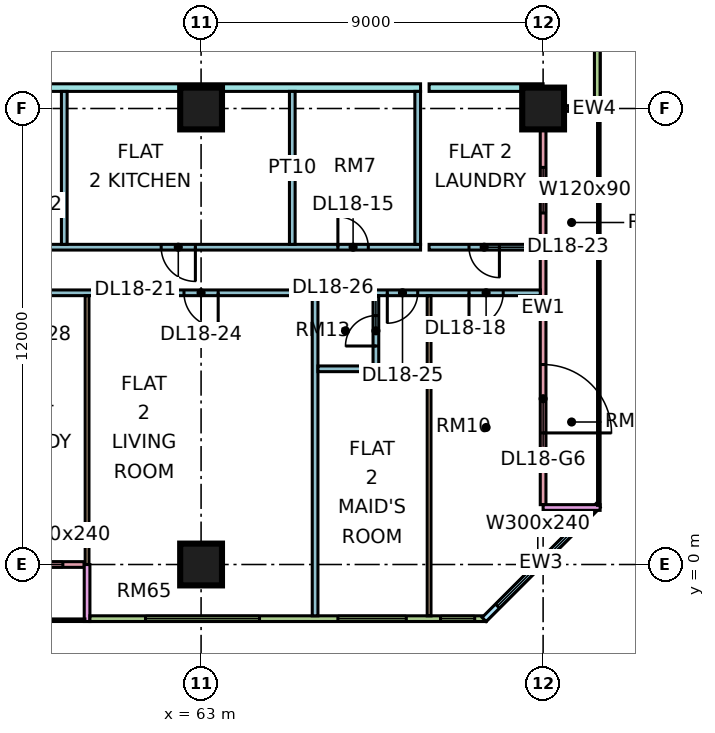
"""IFC4 building model, lengths in metres.
Left out: names, types, materials, properties, quantities, classifications, styles, units other than length and angle.
Written with IfcOpenShell. Run it as: python <this file> out.ifc"""

import sys

from ifc_helpers import new_model, si_unit, direction, frame, frame_2d, origin, origin_2d, place, context, subcontext, project, spatial, rectangle, extrude, element, fill, save


model = new_model("IFC4")
c1 = context("Model", 3, precision=1e-05, world=origin(), true_north=direction((0.0, 1.0)))
c2 = subcontext(c1, "Body", "Model", "MODEL_VIEW")
j1 = project(units=[si_unit("LENGTHUNIT", "METRE"), si_unit("PLANEANGLEUNIT", "RADIAN")], contexts=[c1])
p1 = place(None, origin())
s1 = spatial("IfcSite", under=j1, at=p1, CompositionType="ELEMENT")
p2 = place(p1, origin())
s2 = spatial("IfcBuilding", under=s1, at=p2, CompositionType="ELEMENT")
p3 = place(p2, frame((0.0, 0.0, 82.65)))
s3 = spatial("IfcBuildingStorey", under=s2, at=p3, CompositionType="ELEMENT", Elevation=82.65)
for number, where, z_axis, x_axis in (
    (1, (63.0, 0.0, 0.0), (0.0, 0.0, 1.0), (1.0, 0.0, 0.0)),
    (2, (63.0, 12.0, 0.0), (0.0, 0.0, 1.0), (1.0, 0.0, 0.0)),
    (3, (72.0, 12.0, 0.0), (0.0, 0.0, 1.0), (1.0, 0.0, 0.0)),
):
    element("IfcColumn", number, at=place(p3, frame(where, z_axis=z_axis, x_axis=x_axis)), inside=s3, PredefinedType="COLUMN", context=c2, shape_type="SweptSolid", body=[
        extrude(rectangle(XDim=1.1, YDim=1.1, at=origin_2d()), origin(), (0.0, 0.0, 1.0), 3.75),
    ])
p4 = place(p3, frame((48.075, 0.0, 0.0), z_axis=(0.0, 0.0, 1.0), x_axis=(1.0, 0.0, 0.0)))
e4 = element("IfcWall", 4, at=p4, inside=s3, PredefinedType="SOLIDWALL", context=c2, shape_type="SweptSolid", body=[
    extrude(rectangle(XDim=11.85, YDim=0.15, at=frame_2d((5.925, 0.0))), origin(), (0.0, 0.0, 1.0), 3.3),
])
p5 = place(p4, frame((0.562, 0.0, 0.45)))
e5 = element("IfcOpeningElement", 5, at=p5, cuts=e4, PredefinedType="OPENING", context=c2, shape_type="SweptSolid", body=[
    extrude(rectangle(XDim=1.8, YDim=2.4, at=frame_2d((0.9, 1.2))), frame((0.0, 0.085, 0.0), z_axis=(0.0, -1.0, 0.0), x_axis=(1.0, 0.0, 0.0)), (0.0, 0.0, 1.0), 0.17),
])
p6 = place(p4, frame((3.5, 0.0, 0.45)))
e6 = element("IfcOpeningElement", 6, at=p6, cuts=e4, PredefinedType="OPENING", context=c2, shape_type="SweptSolid", body=[
    extrude(rectangle(XDim=1.2, YDim=2.4, at=frame_2d((0.6, 1.2))), frame((0.0, 0.085, 0.0), z_axis=(0.0, -1.0, 0.0), x_axis=(1.0, 0.0, 0.0)), (0.0, 0.0, 1.0), 0.17),
])
p7 = place(p4, frame((7.15, 0.0, 0.45)))
e7 = element("IfcOpeningElement", 7, at=p7, cuts=e4, PredefinedType="OPENING", context=c2, shape_type="SweptSolid", body=[
    extrude(rectangle(XDim=1.2, YDim=2.4, at=frame_2d((0.6, 1.2))), frame((0.0, 0.085, 0.0), z_axis=(0.0, -1.0, 0.0), x_axis=(1.0, 0.0, 0.0)), (0.0, 0.0, 1.0), 0.17),
])
p8 = place(p4, frame((9.488, 0.0, 0.45)))
e8 = element("IfcOpeningElement", 8, at=p8, cuts=e4, PredefinedType="OPENING", context=c2, shape_type="SweptSolid", body=[
    extrude(rectangle(XDim=1.8, YDim=2.4, at=frame_2d((0.9, 1.2))), frame((0.0, 0.085, 0.0), z_axis=(0.0, -1.0, 0.0), x_axis=(1.0, 0.0, 0.0)), (0.0, 0.0, 1.0), 0.17),
])
p9 = place(p3, frame((60.0, -1.5, 0.0), z_axis=(0.0, 0.0, 1.0), x_axis=(0.0, 1.0, 0.0)))
e9 = element("IfcWall", 9, at=p9, inside=s3, PredefinedType="SOLIDWALL", context=c2, shape_type="SweptSolid", body=[
    extrude(rectangle(XDim=1.5, YDim=0.15, at=frame_2d((0.75, 0.0))), origin(), (0.0, 0.0, 1.0), 3.3),
])
p10 = place(p3, frame((60.075, -1.425, 0.0), z_axis=(0.0, 0.0, 1.0), x_axis=(1.0, 0.0, 0.0)))
e10 = element("IfcWall", 10, at=p10, inside=s3, PredefinedType="SOLIDWALL", context=c2, shape_type="SweptSolid", body=[
    extrude(rectangle(XDim=10.425, YDim=0.15, at=frame_2d((5.212, 0.0))), origin(), (0.0, 0.0, 1.0), 3.3),
])
p11 = place(p10, frame((1.462, 0.0, 0.45)))
e11 = element("IfcOpeningElement", 11, at=p11, cuts=e10, PredefinedType="OPENING", context=c2, shape_type="SweptSolid", body=[
    extrude(rectangle(XDim=3.0, YDim=2.4, at=frame_2d((1.5, 1.2))), frame((0.0, 0.085, 0.0), z_axis=(0.0, -1.0, 0.0), x_axis=(1.0, 0.0, 0.0)), (0.0, 0.0, 1.0), 0.17),
])
p12 = place(p10, frame((6.525, 0.0, 0.45)))
e12 = element("IfcOpeningElement", 12, at=p12, cuts=e10, PredefinedType="OPENING", context=c2, shape_type="SweptSolid", body=[
    extrude(rectangle(XDim=1.8, YDim=2.4, at=frame_2d((0.9, 1.2))), frame((0.0, 0.085, 0.0), z_axis=(0.0, -1.0, 0.0), x_axis=(1.0, 0.0, 0.0)), (0.0, 0.0, 1.0), 0.17),
])
p13 = place(p10, frame((9.225, 0.0, 0.45)))
e13 = element("IfcOpeningElement", 13, at=p13, cuts=e10, PredefinedType="OPENING", context=c2, shape_type="SweptSolid", body=[
    extrude(rectangle(XDim=0.9, YDim=2.4, at=frame_2d((0.45, 1.2))), frame((0.0, 0.085, 0.0), z_axis=(0.0, -1.0, 0.0), x_axis=(1.0, 0.0, 0.0)), (0.0, 0.0, 1.0), 0.17),
])
p14 = place(p3, frame((70.447, -1.447, 0.0), z_axis=(0.0, 0.0, 1.0), x_axis=(0.707106781187, 0.707106781187, 0.0)))
e14 = element("IfcWall", 14, at=p14, inside=s3, PredefinedType="SOLIDWALL", context=c2, shape_type="SweptSolid", body=[
    extrude(rectangle(XDim=4.243, YDim=0.15, at=frame_2d((2.121, 0.0))), origin(), (0.0, 0.0, 1.0), 3.3),
])
p15 = place(p14, frame((0.498, 0.0, 0.45)))
e15 = element("IfcOpeningElement", 15, at=p15, cuts=e14, PredefinedType="OPENING", context=c2, shape_type="SweptSolid", body=[
    extrude(rectangle(XDim=3.0, YDim=2.4, at=frame_2d((1.5, 1.2))), frame((0.0, 0.085, 0.0), z_axis=(0.0, -1.0, 0.0), x_axis=(1.0, 0.0, 0.0)), (0.0, 0.0, 1.0), 0.17),
])
p16 = place(p3, frame((72.0, 1.575, 0.0), z_axis=(0.0, 0.0, 1.0), x_axis=(0.0, 1.0, 0.0)))
e16 = element("IfcWall", 16, at=p16, inside=s3, PredefinedType="SOLIDWALL", context=c2, shape_type="SweptSolid", body=[
    extrude(rectangle(XDim=10.35, YDim=0.15, at=frame_2d((5.175, 0.0))), origin(), (0.0, 0.0, 1.0), 3.3),
])
p17 = place(p16, frame((1.887, 0.0, 0.0)))
e17 = element("IfcOpeningElement", 17, at=p17, cuts=e16, PredefinedType="OPENING", context=c2, shape_type="SweptSolid", body=[
    extrude(rectangle(XDim=1.8, YDim=2.4, at=frame_2d((0.9, 1.2))), frame((0.0, 0.085, 0.0), z_axis=(0.0, -1.0, 0.0), x_axis=(1.0, 0.0, 0.0)), (0.0, 0.0, 1.0), 0.17),
])
p18 = place(p16, frame((7.675, 0.0, 1.7)))
e18 = element("IfcOpeningElement", 18, at=p18, cuts=e16, PredefinedType="OPENING", context=c2, shape_type="SweptSolid", body=[
    extrude(rectangle(XDim=1.2, YDim=0.9, at=frame_2d((0.6, 0.45))), frame((0.0, 0.085, 0.0), z_axis=(0.0, -1.0, 0.0), x_axis=(1.0, 0.0, 0.0)), (0.0, 0.0, 1.0), 0.17),
])
for number, where, z_axis, x_axis in (
    (19, (73.5, 1.5, 0.0), (0.0, 0.0, 1.0), (-1.0, 0.0, 0.0)),
    (20, (73.5, 12.0, 0.0), (0.0, 0.0, 1.0), (-1.0, 0.0, 0.0)),
):
    element("IfcWall", number, at=place(p3, frame(where, z_axis=z_axis, x_axis=x_axis)), inside=s3, PredefinedType="SOLIDWALL", context=c2, shape_type="SweptSolid", body=[
        extrude(rectangle(XDim=1.5, YDim=0.15, at=frame_2d((0.75, 0.0))), origin(), (0.0, 0.0, 1.0), 3.3),
    ])
p19 = place(p3, frame((73.425, 12.075, 0.0), z_axis=(0.0, 0.0, 1.0), x_axis=(0.0, 1.0, 0.0)))
e21 = element("IfcWall", 21, at=p19, inside=s3, PredefinedType="SOLIDWALL", context=c2, shape_type="SweptSolid", body=[
    extrude(rectangle(XDim=10.425, YDim=0.15, at=frame_2d((5.212, 0.0))), origin(), (0.0, 0.0, 1.0), 3.3),
])
p20 = place(p19, frame((6.375, 0.0, 0.45)))
e22 = element("IfcOpeningElement", 22, at=p20, cuts=e21, PredefinedType="OPENING", context=c2, shape_type="SweptSolid", body=[
    extrude(rectangle(XDim=0.9, YDim=2.4, at=frame_2d((0.45, 1.2))), frame((0.0, 0.085, 0.0), z_axis=(0.0, -1.0, 0.0), x_axis=(1.0, 0.0, 0.0)), (0.0, 0.0, 1.0), 0.17),
])
p21 = place(p19, frame((8.175, 0.0, 0.45)))
e23 = element("IfcOpeningElement", 23, at=p21, cuts=e21, PredefinedType="OPENING", context=c2, shape_type="SweptSolid", body=[
    extrude(rectangle(XDim=1.8, YDim=2.4, at=frame_2d((0.9, 1.2))), frame((0.0, 0.085, 0.0), z_axis=(0.0, -1.0, 0.0), x_axis=(1.0, 0.0, 0.0)), (0.0, 0.0, 1.0), 0.17),
])
p22 = place(p3, frame((40.65, 12.55, 0.0), z_axis=(0.0, 0.0, 1.0), x_axis=(1.0, 0.0, 0.0)))
e24 = element("IfcWall", 24, at=p22, inside=s3, PredefinedType="PARTITIONING", context=c2, shape_type="SweptSolid", body=[
    extrude(rectangle(XDim=28.125, YDim=0.2, at=frame_2d((14.062, 0.0))), origin(), (0.0, 0.0, 1.0), 3.3),
])
p23 = place(p22, frame((11.4, 0.0, 0.0)))
e25 = element("IfcOpeningElement", 25, at=p23, cuts=e24, PredefinedType="OPENING", context=c2, shape_type="SweptSolid", body=[
    extrude(rectangle(XDim=1.0, YDim=2.1, at=frame_2d((0.5, 1.05))), frame((0.0, 0.11, 0.0), z_axis=(0.0, -1.0, 0.0), x_axis=(1.0, 0.0, 0.0)), (0.0, 0.0, 1.0), 0.22),
])
p24 = place(p22, frame((1.05, 0.0, 0.0)))
e26 = element("IfcOpeningElement", 26, at=p24, cuts=e24, PredefinedType="OPENING", context=c2, shape_type="SweptSolid", body=[
    extrude(rectangle(XDim=1.0, YDim=2.1, at=frame_2d((0.5, 1.05))), frame((0.0, 0.11, 0.0), z_axis=(0.0, -1.0, 0.0), x_axis=(1.0, 0.0, 0.0)), (0.0, 0.0, 1.0), 0.22),
])
p25 = place(p3, frame((48.1, 7.15, 0.0), z_axis=(0.0, 0.0, 1.0), x_axis=(1.0, 0.0, 0.0)))
e27 = element("IfcWall", 27, at=p25, inside=s3, PredefinedType="PARTITIONING", context=c2, shape_type="SweptSolid", body=[
    extrude(rectangle(XDim=23.826, YDim=0.15, at=frame_2d((11.913, 0.0))), origin(), (0.0, 0.0, 1.0), 3.3),
])
p26 = place(p25, frame((0.95, 0.0, 0.0)))
e28 = element("IfcOpeningElement", 28, at=p26, cuts=e27, PredefinedType="OPENING", context=c2, shape_type="SweptSolid", body=[
    extrude(rectangle(XDim=0.9, YDim=2.1, at=frame_2d((0.45, 1.05))), frame((0.0, 0.085, 0.0), z_axis=(0.0, -1.0, 0.0), x_axis=(1.0, 0.0, 0.0)), (0.0, 0.0, 1.0), 0.17),
])
p27 = place(p25, frame((6.95, 0.0, 0.0)))
e29 = element("IfcOpeningElement", 29, at=p27, cuts=e27, PredefinedType="OPENING", context=c2, shape_type="SweptSolid", body=[
    extrude(rectangle(XDim=0.9, YDim=2.1, at=frame_2d((0.45, 1.05))), frame((0.0, 0.085, 0.0), z_axis=(0.0, -1.0, 0.0), x_axis=(1.0, 0.0, 0.0)), (0.0, 0.0, 1.0), 0.17),
])
p28 = place(p25, frame((21.95, 0.0, 0.0)))
e30 = element("IfcOpeningElement", 30, at=p28, cuts=e27, PredefinedType="OPENING", context=c2, shape_type="SweptSolid", body=[
    extrude(rectangle(XDim=0.9, YDim=2.1, at=frame_2d((0.45, 1.05))), frame((0.0, 0.085, 0.0), z_axis=(0.0, -1.0, 0.0), x_axis=(1.0, 0.0, 0.0)), (0.0, 0.0, 1.0), 0.17),
])
p29 = place(p25, frame((14.45, 0.0, 0.0)))
e31 = element("IfcOpeningElement", 31, at=p29, cuts=e27, PredefinedType="OPENING", context=c2, shape_type="SweptSolid", body=[
    extrude(rectangle(XDim=0.9, YDim=2.1, at=frame_2d((0.45, 1.05))), frame((0.0, 0.085, 0.0), z_axis=(0.0, -1.0, 0.0), x_axis=(1.0, 0.0, 0.0)), (0.0, 0.0, 1.0), 0.17),
])
p30 = place(p25, frame((19.8, 0.0, 0.0)))
e32 = element("IfcOpeningElement", 32, at=p30, cuts=e27, PredefinedType="OPENING", context=c2, shape_type="SweptSolid", body=[
    extrude(rectangle(XDim=0.8, YDim=2.1, at=frame_2d((0.4, 1.05))), frame((0.0, 0.085, 0.0), z_axis=(0.0, -1.0, 0.0), x_axis=(1.0, 0.0, 0.0)), (0.0, 0.0, 1.0), 0.17),
])
p31 = place(p25, frame((3.65, 0.0, 0.0)))
e33 = element("IfcOpeningElement", 33, at=p31, cuts=e27, PredefinedType="OPENING", context=c2, shape_type="SweptSolid", body=[
    extrude(rectangle(XDim=1.6, YDim=2.1, at=frame_2d((0.8, 1.05))), frame((0.0, 0.085, 0.0), z_axis=(0.0, -1.0, 0.0), x_axis=(1.0, 0.0, 0.0)), (0.0, 0.0, 1.0), 0.17),
])
p32 = place(p25, frame((9.95, 0.0, 0.0)))
e34 = element("IfcOpeningElement", 34, at=p32, cuts=e27, PredefinedType="OPENING", context=c2, shape_type="SweptSolid", body=[
    extrude(rectangle(XDim=0.9, YDim=2.1, at=frame_2d((0.45, 1.05))), frame((0.0, 0.085, 0.0), z_axis=(0.0, -1.0, 0.0), x_axis=(1.0, 0.0, 0.0)), (0.0, 0.0, 1.0), 0.17),
])
p33 = place(p3, frame((53.325, 8.35, 0.0), z_axis=(0.0, 0.0, 1.0), x_axis=(1.0, 0.0, 0.0)))
e35 = element("IfcWall", 35, at=p33, inside=s3, PredefinedType="PARTITIONING", context=c2, shape_type="SweptSolid", body=[
    extrude(rectangle(XDim=15.45, YDim=0.15, at=frame_2d((7.725, 0.0))), origin(), (0.0, 0.0, 1.0), 3.3),
])
p34 = place(p33, frame((13.275, 0.0, 0.0)))
e36 = element("IfcOpeningElement", 36, at=p34, cuts=e35, PredefinedType="OPENING", context=c2, shape_type="SweptSolid", body=[
    extrude(rectangle(XDim=0.8, YDim=2.1, at=frame_2d((0.4, 1.05))), frame((0.0, 0.085, 0.0), z_axis=(0.0, -1.0, 0.0), x_axis=(1.0, 0.0, 0.0)), (0.0, 0.0, 1.0), 0.17),
])
p35 = place(p33, frame((8.625, 0.0, 0.0)))
e37 = element("IfcOpeningElement", 37, at=p35, cuts=e35, PredefinedType="OPENING", context=c2, shape_type="SweptSolid", body=[
    extrude(rectangle(XDim=0.9, YDim=2.1, at=frame_2d((0.45, 1.05))), frame((0.0, 0.085, 0.0), z_axis=(0.0, -1.0, 0.0), x_axis=(1.0, 0.0, 0.0)), (0.0, 0.0, 1.0), 0.17),
])
p36 = place(p33, frame((4.525, 0.0, 0.0)))
e38 = element("IfcOpeningElement", 38, at=p36, cuts=e35, PredefinedType="OPENING", context=c2, shape_type="SweptSolid", body=[
    extrude(rectangle(XDim=0.8, YDim=2.1, at=frame_2d((0.4, 1.05))), frame((0.0, 0.085, 0.0), z_axis=(0.0, -1.0, 0.0), x_axis=(1.0, 0.0, 0.0)), (0.0, 0.0, 1.0), 0.17),
])
p37 = place(p3, frame((59.4, 8.425, 0.0), z_axis=(0.0, 0.0, 1.0), x_axis=(0.0, 1.0, 0.0)))
e39 = element("IfcWall", 39, at=p37, inside=s3, PredefinedType="PARTITIONING", context=c2, shape_type="SweptSolid", body=[
    extrude(rectangle(XDim=4.025, YDim=0.15, at=frame_2d((2.012, 0.0))), origin(), (0.0, 0.0, 1.0), 3.3),
])
p38 = place(p3, frame((60.0, 0.0, 0.0), z_axis=(0.0, 0.0, 1.0), x_axis=(0.0, 1.0, 0.0)))
e40 = element("IfcWall", 40, at=p38, inside=s3, PredefinedType="PARTITIONING", context=c2, shape_type="SweptSolid", body=[
    extrude(rectangle(XDim=7.075, YDim=0.1, at=frame_2d((3.538, 0.0))), origin(), (0.0, 0.0, 1.0), 3.3),
])
p39 = place(p3, frame((65.4, 8.425, 0.0), z_axis=(0.0, 0.0, 1.0), x_axis=(0.0, 1.0, 0.0)))
e41 = element("IfcWall", 41, at=p39, inside=s3, PredefinedType="PARTITIONING", context=c2, shape_type="SweptSolid", body=[
    extrude(rectangle(XDim=4.025, YDim=0.15, at=frame_2d((2.012, 0.0))), origin(), (0.0, 0.0, 1.0), 3.3),
])
p40 = place(p3, frame((66.0, -1.35, 0.0), z_axis=(0.0, 0.0, 1.0), x_axis=(0.0, 1.0, 0.0)))
e42 = element("IfcWall", 42, at=p40, inside=s3, PredefinedType="PARTITIONING", context=c2, shape_type="SweptSolid", body=[
    extrude(rectangle(XDim=8.425, YDim=0.15, at=frame_2d((4.212, 0.0))), origin(), (0.0, 0.0, 1.0), 3.3),
])
p41 = place(p3, frame((66.075, 5.15, 0.0), z_axis=(0.0, 0.0, 1.0), x_axis=(1.0, 0.0, 0.0)))
e43 = element("IfcWall", 43, at=p41, inside=s3, PredefinedType="PARTITIONING", context=c2, shape_type="SweptSolid", body=[
    extrude(rectangle(XDim=1.45, YDim=0.15, at=frame_2d((0.725, 0.0))), origin(), (0.0, 0.0, 1.0), 3.3),
])
p42 = place(p3, frame((67.6, 5.075, 0.0), z_axis=(0.0, 0.0, 1.0), x_axis=(0.0, 1.0, 0.0)))
e44 = element("IfcWall", 44, at=p42, inside=s3, PredefinedType="PARTITIONING", context=c2, shape_type="SweptSolid", body=[
    extrude(rectangle(XDim=2.0, YDim=0.15, at=frame_2d((1.0, 0.0))), origin(), (0.0, 0.0, 1.0), 3.3),
])
p43 = place(p42, frame((0.675, 0.0, 0.0)))
e45 = element("IfcOpeningElement", 45, at=p43, cuts=e44, PredefinedType="OPENING", context=c2, shape_type="SweptSolid", body=[
    extrude(rectangle(XDim=0.8, YDim=2.1, at=frame_2d((0.4, 1.05))), frame((0.0, 0.085, 0.0), z_axis=(0.0, -1.0, 0.0), x_axis=(1.0, 0.0, 0.0)), (0.0, 0.0, 1.0), 0.17),
])
p44 = place(p3, frame((68.7, 8.425, 0.0), z_axis=(0.0, 0.0, 1.0), x_axis=(0.0, 1.0, 0.0)))
e46 = element("IfcWall", 46, at=p44, inside=s3, PredefinedType="PARTITIONING", context=c2, shape_type="SweptSolid", body=[
    extrude(rectangle(XDim=4.025, YDim=0.15, at=frame_2d((2.012, 0.0))), origin(), (0.0, 0.0, 1.0), 3.3),
])
p45 = place(p3, frame((69.0, -1.351, 0.0), z_axis=(0.0, 0.0, 1.0), x_axis=(0.0, 1.0, 0.0)))
e47 = element("IfcWall", 47, at=p45, inside=s3, PredefinedType="PARTITIONING", context=c2, shape_type="SweptSolid", body=[
    extrude(rectangle(XDim=8.426, YDim=0.1, at=frame_2d((4.213, 0.0))), origin(), (0.0, 0.0, 1.0), 3.3),
])
p46 = place(p3, frame((69.0, 8.35, 0.0), z_axis=(0.0, 0.0, 1.0), x_axis=(1.0, 0.0, 0.0)))
e48 = element("IfcWall", 48, at=p46, inside=s3, PredefinedType="PARTITIONING", context=c2, shape_type="SweptSolid", body=[
    extrude(rectangle(XDim=2.926, YDim=0.15, at=frame_2d((1.463, 0.0))), origin(), (0.0, 0.0, 1.0), 3.3),
])
p47 = place(p46, frame((1.05, 0.0, 0.0)))
e49 = element("IfcOpeningElement", 49, at=p47, cuts=e48, PredefinedType="OPENING", context=c2, shape_type="SweptSolid", body=[
    extrude(rectangle(XDim=0.8, YDim=2.1, at=frame_2d((0.4, 1.05))), frame((0.0, 0.085, 0.0), z_axis=(0.0, -1.0, 0.0), x_axis=(1.0, 0.0, 0.0)), (0.0, 0.0, 1.0), 0.17),
])
p48 = place(p3, frame((69.0, 12.55, 0.0), z_axis=(0.0, 0.0, 1.0), x_axis=(1.0, 0.0, 0.0)))
e50 = element("IfcWall", 50, at=p48, inside=s3, PredefinedType="PARTITIONING", context=c2, shape_type="SweptSolid", body=[
    extrude(rectangle(XDim=3.0, YDim=0.2, at=frame_2d((1.5, 0.0))), origin(), (0.0, 0.0, 1.0), 3.3),
])
p49 = place(p8, origin())
e51 = element("IfcWindow", 51, at=p49, inside=s3, PartitioningType="SINGLE_PANEL", PredefinedType="WINDOW", context=c2, shape_type="SweptSolid", body=[
    extrude(rectangle(XDim=1.8, YDim=2.4, at=frame_2d((0.9, 1.2))), frame((0.0, 0.03, 0.0), z_axis=(0.0, -1.0, 0.0), x_axis=(1.0, 0.0, 0.0)), (0.0, 0.0, 1.0), 0.06),
])
fill(e8, e51)
p50 = place(p11, origin())
e52 = element("IfcWindow", 52, at=p50, inside=s3, PartitioningType="SINGLE_PANEL", PredefinedType="WINDOW", context=c2, shape_type="SweptSolid", body=[
    extrude(rectangle(XDim=3.0, YDim=2.4, at=frame_2d((1.5, 1.2))), frame((0.0, 0.03, 0.0), z_axis=(0.0, -1.0, 0.0), x_axis=(1.0, 0.0, 0.0)), (0.0, 0.0, 1.0), 0.06),
])
fill(e11, e52)
p51 = place(p12, origin())
e53 = element("IfcWindow", 53, at=p51, inside=s3, PartitioningType="SINGLE_PANEL", PredefinedType="WINDOW", context=c2, shape_type="SweptSolid", body=[
    extrude(rectangle(XDim=1.8, YDim=2.4, at=frame_2d((0.9, 1.2))), frame((0.0, 0.03, 0.0), z_axis=(0.0, -1.0, 0.0), x_axis=(1.0, 0.0, 0.0)), (0.0, 0.0, 1.0), 0.06),
])
fill(e12, e53)
p52 = place(p13, origin())
e54 = element("IfcWindow", 54, at=p52, inside=s3, PartitioningType="SINGLE_PANEL", PredefinedType="WINDOW", context=c2, shape_type="SweptSolid", body=[
    extrude(rectangle(XDim=0.9, YDim=2.4, at=frame_2d((0.45, 1.2))), frame((0.0, 0.03, 0.0), z_axis=(0.0, -1.0, 0.0), x_axis=(1.0, 0.0, 0.0)), (0.0, 0.0, 1.0), 0.06),
])
fill(e13, e54)
p53 = place(p15, origin())
e55 = element("IfcWindow", 55, at=p53, inside=s3, PartitioningType="SINGLE_PANEL", PredefinedType="WINDOW", context=c2, shape_type="SweptSolid", body=[
    extrude(rectangle(XDim=3.0, YDim=2.4, at=frame_2d((1.5, 1.2))), frame((0.0, 0.03, 0.0), z_axis=(0.0, -1.0, 0.0), x_axis=(1.0, 0.0, 0.0)), (0.0, 0.0, 1.0), 0.06),
])
fill(e15, e55)
p54 = place(p17, frame((1.8, 0.0, 0.0), z_axis=(0.0, 0.0, 1.0), x_axis=(-1.0, 0.0, 0.0)))
e56 = element("IfcDoor", 56, at=p54, inside=s3, OperationType="DOUBLE_DOOR_SINGLE_SWING", PredefinedType="DOOR", context=c2, shape_type="SweptSolid", body=[
    extrude(rectangle(XDim=1.8, YDim=2.4, at=frame_2d((0.9, 1.2))), frame((0.0, 0.025, 0.0), z_axis=(0.0, -1.0, 0.0), x_axis=(1.0, 0.0, 0.0)), (0.0, 0.0, 1.0), 0.05),
])
fill(e17, e56)
p55 = place(p18, origin())
e57 = element("IfcWindow", 57, at=p55, inside=s3, PartitioningType="SINGLE_PANEL", PredefinedType="WINDOW", context=c2, shape_type="SweptSolid", body=[
    extrude(rectangle(XDim=1.2, YDim=0.9, at=frame_2d((0.6, 0.45))), frame((0.0, 0.03, 0.0), z_axis=(0.0, -1.0, 0.0), x_axis=(1.0, 0.0, 0.0)), (0.0, 0.0, 1.0), 0.06),
])
fill(e18, e57)
p56 = place(p34, origin())
e58 = element("IfcDoor", 58, at=p56, inside=s3, OperationType="SINGLE_SWING_LEFT", PredefinedType="DOOR", context=c2, shape_type="SweptSolid", body=[
    extrude(rectangle(XDim=0.8, YDim=2.1, at=frame_2d((0.4, 1.05))), frame((0.0, 0.025, 0.0), z_axis=(0.0, -1.0, 0.0), x_axis=(1.0, 0.0, 0.0)), (0.0, 0.0, 1.0), 0.05),
])
fill(e36, e58)
p57 = place(p28, frame((0.9, 0.0, 0.0), z_axis=(0.0, 0.0, 1.0), x_axis=(-1.0, 0.0, 0.0)))
e59 = element("IfcDoor", 59, at=p57, inside=s3, OperationType="SINGLE_SWING_LEFT", PredefinedType="DOOR", context=c2, shape_type="SweptSolid", body=[
    extrude(rectangle(XDim=0.9, YDim=2.1, at=frame_2d((0.45, 1.05))), frame((0.0, 0.025, 0.0), z_axis=(0.0, -1.0, 0.0), x_axis=(1.0, 0.0, 0.0)), (0.0, 0.0, 1.0), 0.05),
])
fill(e30, e59)
p58 = place(p35, origin())
e60 = element("IfcDoor", 60, at=p58, inside=s3, OperationType="SINGLE_SWING_RIGHT", PredefinedType="DOOR", context=c2, shape_type="SweptSolid", body=[
    extrude(rectangle(XDim=0.9, YDim=2.1, at=frame_2d((0.45, 1.05))), frame((0.0, 0.025, 0.0), z_axis=(0.0, -1.0, 0.0), x_axis=(1.0, 0.0, 0.0)), (0.0, 0.0, 1.0), 0.05),
])
fill(e37, e60)
p59 = place(p47, origin())
e61 = element("IfcDoor", 61, at=p59, inside=s3, OperationType="SINGLE_SWING_RIGHT", PredefinedType="DOOR", context=c2, shape_type="SweptSolid", body=[
    extrude(rectangle(XDim=0.8, YDim=2.1, at=frame_2d((0.4, 1.05))), frame((0.0, 0.025, 0.0), z_axis=(0.0, -1.0, 0.0), x_axis=(1.0, 0.0, 0.0)), (0.0, 0.0, 1.0), 0.05),
])
fill(e49, e61)
p60 = place(p29, origin())
e62 = element("IfcDoor", 62, at=p60, inside=s3, OperationType="SINGLE_SWING_RIGHT", PredefinedType="DOOR", context=c2, shape_type="SweptSolid", body=[
    extrude(rectangle(XDim=0.9, YDim=2.1, at=frame_2d((0.45, 1.05))), frame((0.0, 0.025, 0.0), z_axis=(0.0, -1.0, 0.0), x_axis=(1.0, 0.0, 0.0)), (0.0, 0.0, 1.0), 0.05),
])
fill(e31, e62)
p61 = place(p30, frame((0.8, 0.0, 0.0), z_axis=(0.0, 0.0, 1.0), x_axis=(-1.0, 0.0, 0.0)))
e63 = element("IfcDoor", 63, at=p61, inside=s3, OperationType="SINGLE_SWING_LEFT", PredefinedType="DOOR", context=c2, shape_type="SweptSolid", body=[
    extrude(rectangle(XDim=0.8, YDim=2.1, at=frame_2d((0.4, 1.05))), frame((0.0, 0.025, 0.0), z_axis=(0.0, -1.0, 0.0), x_axis=(1.0, 0.0, 0.0)), (0.0, 0.0, 1.0), 0.05),
])
fill(e32, e63)
p62 = place(p43, origin())
e64 = element("IfcDoor", 64, at=p62, inside=s3, OperationType="SINGLE_SWING_LEFT", PredefinedType="DOOR", context=c2, shape_type="SweptSolid", body=[
    extrude(rectangle(XDim=0.8, YDim=2.1, at=frame_2d((0.4, 1.05))), frame((0.0, 0.025, 0.0), z_axis=(0.0, -1.0, 0.0), x_axis=(1.0, 0.0, 0.0)), (0.0, 0.0, 1.0), 0.05),
])
fill(e45, e64)
save(model, sys.argv[1])
